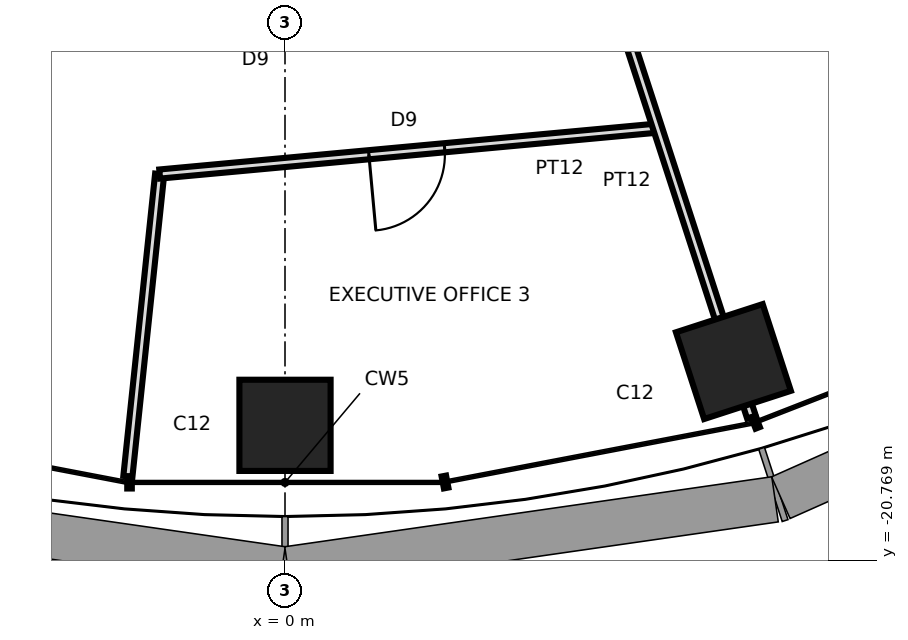
"""IFC4 building model, lengths in metres.
Left out: names, types, materials, properties, quantities, classifications, styles, units other than length and angle.
Written with IfcOpenShell. Run it as: python <this file> out.ifc"""

import sys

from ifc_helpers import new_model, si_unit, direction, frame, frame_2d, origin, origin_2d, place, context, subcontext, project, spatial, rectangle, extrude, element, fill, save


model = new_model("IFC4")
c1 = context("Model", 3, precision=1e-05, world=origin(), true_north=direction((0.0, 1.0)))
c2 = subcontext(c1, "Body", "Model", "MODEL_VIEW")
j1 = project(units=[si_unit("LENGTHUNIT", "METRE"), si_unit("PLANEANGLEUNIT", "RADIAN")], contexts=[c1])
p1 = place(None, origin())
s1 = spatial("IfcSite", under=j1, at=p1, CompositionType="ELEMENT")
p2 = place(p1, origin())
s2 = spatial("IfcBuilding", under=s1, at=p2, CompositionType="ELEMENT")
p3 = place(p2, frame((0.0, 0.0, 256.0)))
s3 = spatial("IfcBuildingStorey", under=s2, at=p3, CompositionType="ELEMENT", Elevation=256.0)
for number, where, z_axis, x_axis in (
    (1, (0.0, -18.996, 0.0), (0.0, 0.0, 1.0), (0.0, -1.0, 0.0)),
    (2, (5.9, -18.157, 0.0), (0.0, 0.0, 1.0), (0.309, -0.951, 0.0)),
):
    element("IfcColumn", number, at=place(p3, frame(where, z_axis=z_axis, x_axis=x_axis)), inside=s3, PredefinedType="COLUMN", context=c2, shape_type="SweptSolid", body=[
        extrude(rectangle(XDim=1.2, YDim=1.2, at=origin_2d()), origin(), (0.0, 0.0, 1.0), 4.2),
    ])
p4 = place(p3, frame((-1.649, -15.689, 0.0), z_axis=(0.0, 0.0, 1.0), x_axis=(-0.104554517933, -0.994519156568, 0.0)))
e3 = element("IfcWall", 3, at=p4, inside=s3, PredefinedType="PARTITIONING", context=c2, shape_type="SweptSolid", body=[
    extrude(rectangle(XDim=4.0, YDim=0.12, at=frame_2d((2.0, 0.0))), origin(), (0.0, 0.0, 1.0), 4.04),
])
p5 = place(p3, frame((4.901, -15.085, 0.0), z_axis=(0.0, 0.0, 1.0), x_axis=(-0.995772164665, -0.091857476986, 0.0)))
e4 = element("IfcWall", 4, at=p5, inside=s3, PredefinedType="PARTITIONING", context=c2, shape_type="SweptSolid", body=[
    extrude(rectangle(XDim=6.578, YDim=0.12, at=frame_2d((3.289, 0.0))), origin(), (0.0, 0.0, 1.0), 3.637),
])
p6 = place(p5, frame((2.814, 0.0, 0.0)))
e5 = element("IfcOpeningElement", 5, at=p6, cuts=e4, PredefinedType="OPENING", context=c2, shape_type="SweptSolid", body=[
    extrude(rectangle(XDim=1.0, YDim=2.4, at=frame_2d((0.5, 1.2))), frame((0.0, 0.07, 0.0), z_axis=(0.0, -1.0, 0.0), x_axis=(1.0, 0.0, 0.0)), (0.0, 0.0, 1.0), 0.14),
])
p7 = place(p3, frame((6.137, -18.889, 0.0), z_axis=(0.0, 0.0, 1.0), x_axis=(-0.309007859613, 0.951059484311, 0.0)))
e6 = element("IfcWall", 6, at=p7, inside=s3, PredefinedType="PARTITIONING", context=c2, shape_type="SweptSolid", body=[
    extrude(rectangle(XDim=6.917, YDim=0.12, at=frame_2d((3.458, 0.0))), origin(), (0.0, 0.0, 1.0), 3.24),
])
p8 = place(p6, origin())
e7 = element("IfcDoor", 7, at=p8, inside=s3, OperationType="SINGLE_SWING_RIGHT", PredefinedType="DOOR", context=c2, shape_type="SweptSolid", body=[
    extrude(rectangle(XDim=1.0, YDim=2.4, at=frame_2d((0.5, 1.2))), frame((0.0, 0.025, 0.0), z_axis=(0.0, -1.0, 0.0), x_axis=(1.0, 0.0, 0.0)), (0.0, 0.0, 1.0), 0.05),
])
fill(e5, e7)
save(model, sys.argv[1])
